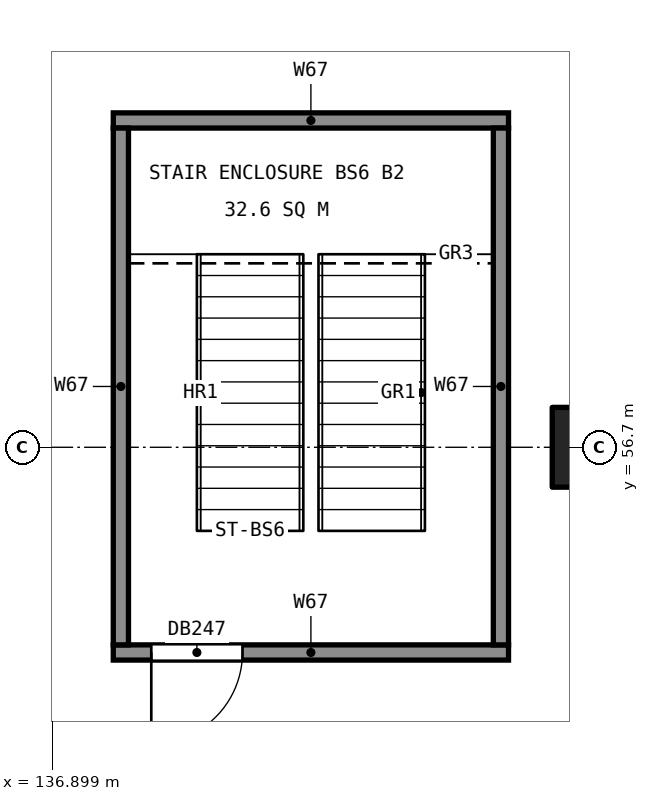
"""IFC4 building model, lengths in metres.
Left out: names, types, materials, properties, quantities, classifications, styles, units other than length and angle.
Written with IfcOpenShell. Run it as: python <this file> out.ifc"""

import sys

from ifc_helpers import new_model, si_unit, direction, frame, frame_2d, origin, origin_2d, place, context, subcontext, project, spatial, rectangle, extrude, element, fill, save


model = new_model("IFC4")
c1 = context("Model", 3, precision=1e-05, world=origin(), true_north=direction((0.0, 1.0)))
c2 = subcontext(c1, "Body", "Model", "MODEL_VIEW")
j1 = project(units=[si_unit("LENGTHUNIT", "METRE"), si_unit("PLANEANGLEUNIT", "RADIAN")], contexts=[c1])
p1 = place(None, origin())
s1 = spatial("IfcSite", under=j1, at=p1, CompositionType="ELEMENT")
p2 = place(p1, origin())
s2 = spatial("IfcBuilding", under=s1, at=p2, CompositionType="ELEMENT")
p3 = place(p2, frame((0.0, 0.0, -9.6)))
s3 = spatial("IfcBuildingStorey", under=s2, at=p3, CompositionType="ELEMENT", Elevation=-9.6)
p4 = place(p3, frame((144.0, 56.7, 0.0), z_axis=(0.0, 0.0, 1.0), x_axis=(1.0, 0.0, 0.0)))
e1 = element("IfcColumn", 1, at=p4, inside=s3, PredefinedType="COLUMN", context=c2, shape_type="SweptSolid", body=[
    extrude(rectangle(XDim=1.05, YDim=1.05, at=origin_2d()), origin(), (0.0, 0.0, 1.0), 4.35),
])
p5 = place(p3, frame((137.7, 54.0, 0.0), z_axis=(0.0, 0.0, 1.0), x_axis=(1.0, 0.0, 0.0)))
e2 = element("IfcWall", 2, at=p5, inside=s3, PredefinedType="SOLIDWALL", context=c2, shape_type="SweptSolid", body=[
    extrude(rectangle(XDim=5.2, YDim=0.2, at=frame_2d((2.6, 0.0))), origin(), (0.0, 0.0, 1.0), 4.35),
])
p6 = place(p5, frame((0.5, 0.0, 0.0)))
e3 = element("IfcOpeningElement", 3, at=p6, cuts=e2, PredefinedType="OPENING", context=c2, shape_type="SweptSolid", body=[
    extrude(rectangle(XDim=1.2, YDim=2.1, at=frame_2d((0.6, 1.05))), frame((0.0, 0.11, 0.0), z_axis=(0.0, -1.0, 0.0), x_axis=(1.0, 0.0, 0.0)), (0.0, 0.0, 1.0), 0.22),
])
p7 = place(p3, frame((137.7, 61.0, 0.0), z_axis=(0.0, 0.0, 1.0), x_axis=(1.0, 0.0, 0.0)))
e4 = element("IfcWall", 4, at=p7, inside=s3, PredefinedType="SOLIDWALL", context=c2, shape_type="SweptSolid", body=[
    extrude(rectangle(XDim=5.2, YDim=0.2, at=frame_2d((2.6, 0.0))), origin(), (0.0, 0.0, 1.0), 4.35),
])
for number, where, z_axis, x_axis in (
    (5, (137.8, 54.1, 0.0), (0.0, 0.0, 1.0), (0.0, 1.0, 0.0)),
    (6, (142.8, 54.1, 0.0), (0.0, 0.0, 1.0), (0.0, 1.0, 0.0)),
):
    element("IfcWall", number, at=place(p3, frame(where, z_axis=z_axis, x_axis=x_axis)), inside=s3, PredefinedType="SOLIDWALL", context=c2, shape_type="SweptSolid", body=[
        extrude(rectangle(XDim=6.8, YDim=0.2, at=frame_2d((3.4, 0.0))), origin(), (0.0, 0.0, 1.0), 4.35),
    ])
p8 = place(p6, frame((1.2, 0.0, 0.0), z_axis=(0.0, 0.0, 1.0), x_axis=(-1.0, 0.0, 0.0)))
e7 = element("IfcDoor", 7, at=p8, inside=s3, OperationType="SINGLE_SWING_RIGHT", PredefinedType="DOOR", context=c2, shape_type="SweptSolid", body=[
    extrude(rectangle(XDim=1.2, YDim=2.1, at=frame_2d((0.6, 1.05))), frame((0.0, 0.025, 0.0), z_axis=(0.0, -1.0, 0.0), x_axis=(1.0, 0.0, 0.0)), (0.0, 0.0, 1.0), 0.05),
])
fill(e3, e7)
save(model, sys.argv[1])
